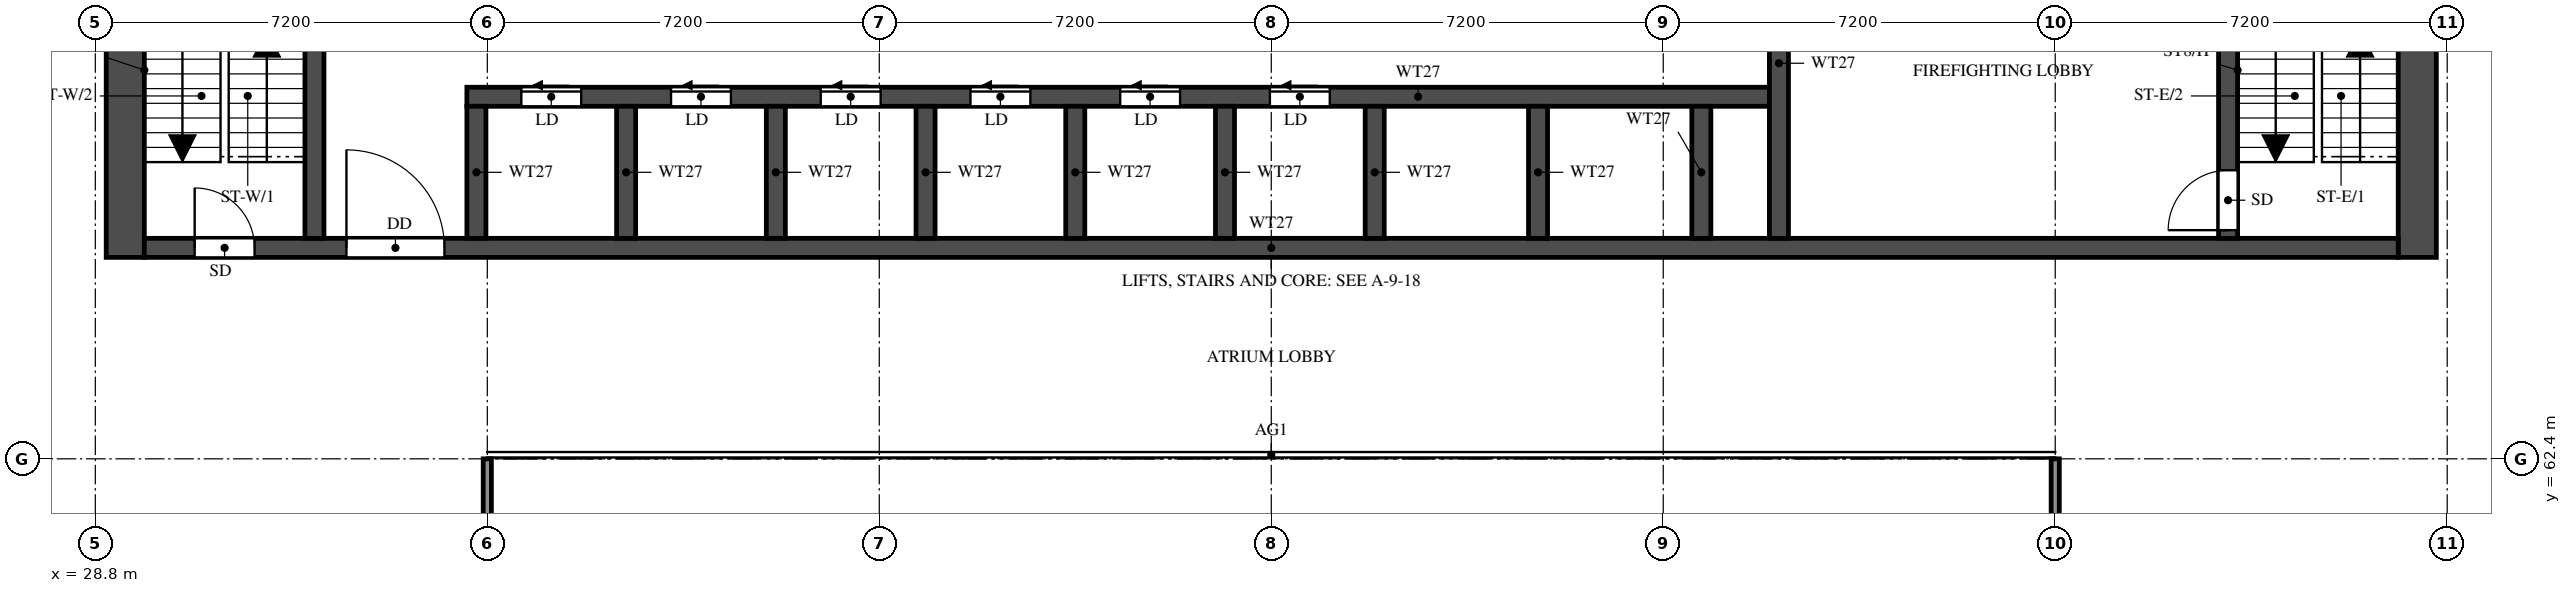
"""IFC4 building model, lengths in metres.
Left out: names, types, materials, properties, quantities, classifications, styles, units other than length and angle.
Written with IfcOpenShell. Run it as: python <this file> out.ifc"""

import sys

from ifc_helpers import new_model, si_unit, direction, frame, frame_2d, origin, place, context, subcontext, project, spatial, rectangle, extrude, element, fill, save


model = new_model("IFC4")
c1 = context("Model", 3, precision=1e-05, world=origin(), true_north=direction((0.0, 1.0)))
c2 = subcontext(c1, "Body", "Model", "MODEL_VIEW")
j1 = project(units=[si_unit("LENGTHUNIT", "METRE"), si_unit("PLANEANGLEUNIT", "RADIAN")], contexts=[c1])
p1 = place(None, origin())
s1 = spatial("IfcSite", under=j1, at=p1, CompositionType="ELEMENT")
p2 = place(p1, origin())
s2 = spatial("IfcBuilding", under=s1, at=p2, CompositionType="ELEMENT")
p3 = place(p2, frame((0.0, 0.0, 123.5)))
s3 = spatial("IfcBuildingStorey", under=s2, at=p3, CompositionType="ELEMENT", Elevation=123.5)
for number, where, z_axis, x_axis in (
    (1, (29.35, 66.1, 0.0), (0.0, 0.0, 1.0), (0.0, 1.0, 0.0)),
    (2, (71.45, 66.1, 0.0), (0.0, 0.0, 1.0), (0.0, 1.0, 0.0)),
):
    element("IfcWall", number, at=place(p3, frame(where, z_axis=z_axis, x_axis=x_axis)), inside=s3, PredefinedType="SHEAR", context=c2, shape_type="SweptSolid", body=[
        extrude(rectangle(XDim=11.9, YDim=0.7, at=frame_2d((5.95, 0.0))), origin(), (0.0, 0.0, 1.0), 3.2),
    ])
p4 = place(p3, frame((29.7, 66.275, 0.0), z_axis=(0.0, 0.0, 1.0), x_axis=(1.0, 0.0, 0.0)))
e3 = element("IfcWall", 3, at=p4, inside=s3, PredefinedType="SHEAR", context=c2, shape_type="SweptSolid", body=[
    extrude(rectangle(XDim=41.4, YDim=0.35, at=frame_2d((20.7, 0.0))), origin(), (0.0, 0.0, 1.0), 3.2),
])
p5 = place(p4, frame((0.925, 0.0, 0.0)))
e4 = element("IfcOpeningElement", 4, at=p5, cuts=e3, PredefinedType="OPENING", context=c2, shape_type="SweptSolid", body=[
    extrude(rectangle(XDim=1.1, YDim=2.1, at=frame_2d((0.55, 1.05))), frame((0.0, 0.185, 0.0), z_axis=(0.0, -1.0, 0.0), x_axis=(1.0, 0.0, 0.0)), (0.0, 0.0, 1.0), 0.37),
])
p6 = place(p4, frame((3.712, 0.0, 0.0)))
e5 = element("IfcOpeningElement", 5, at=p6, cuts=e3, PredefinedType="OPENING", context=c2, shape_type="SweptSolid", body=[
    extrude(rectangle(XDim=1.8, YDim=2.1, at=frame_2d((0.9, 1.05))), frame((0.0, 0.185, 0.0), z_axis=(0.0, -1.0, 0.0), x_axis=(1.0, 0.0, 0.0)), (0.0, 0.0, 1.0), 0.37),
])
p7 = place(p3, frame((35.625, 69.05, 0.0), z_axis=(0.0, 0.0, 1.0), x_axis=(1.0, 0.0, 0.0)))
e6 = element("IfcWall", 6, at=p7, inside=s3, PredefinedType="SHEAR", context=c2, shape_type="SweptSolid", body=[
    extrude(rectangle(XDim=24.1, YDim=0.35, at=frame_2d((12.05, 0.0))), origin(), (0.0, 0.0, 1.0), 3.2),
])
p8 = place(p7, frame((1.0, 0.0, 0.0)))
e7 = element("IfcOpeningElement", 7, at=p8, cuts=e6, PredefinedType="OPENING", context=c2, shape_type="SweptSolid", body=[
    extrude(rectangle(XDim=1.1, YDim=2.1, at=frame_2d((0.55, 1.05))), frame((0.0, 0.185, 0.0), z_axis=(0.0, -1.0, 0.0), x_axis=(1.0, 0.0, 0.0)), (0.0, 0.0, 1.0), 0.37),
])
p9 = place(p7, frame((3.75, 0.0, 0.0)))
e8 = element("IfcOpeningElement", 8, at=p9, cuts=e6, PredefinedType="OPENING", context=c2, shape_type="SweptSolid", body=[
    extrude(rectangle(XDim=1.1, YDim=2.1, at=frame_2d((0.55, 1.05))), frame((0.0, 0.185, 0.0), z_axis=(0.0, -1.0, 0.0), x_axis=(1.0, 0.0, 0.0)), (0.0, 0.0, 1.0), 0.37),
])
p10 = place(p7, frame((6.5, 0.0, 0.0)))
e9 = element("IfcOpeningElement", 9, at=p10, cuts=e6, PredefinedType="OPENING", context=c2, shape_type="SweptSolid", body=[
    extrude(rectangle(XDim=1.1, YDim=2.1, at=frame_2d((0.55, 1.05))), frame((0.0, 0.185, 0.0), z_axis=(0.0, -1.0, 0.0), x_axis=(1.0, 0.0, 0.0)), (0.0, 0.0, 1.0), 0.37),
])
p11 = place(p7, frame((9.25, 0.0, 0.0)))
e10 = element("IfcOpeningElement", 10, at=p11, cuts=e6, PredefinedType="OPENING", context=c2, shape_type="SweptSolid", body=[
    extrude(rectangle(XDim=1.1, YDim=2.1, at=frame_2d((0.55, 1.05))), frame((0.0, 0.185, 0.0), z_axis=(0.0, -1.0, 0.0), x_axis=(1.0, 0.0, 0.0)), (0.0, 0.0, 1.0), 0.37),
])
p12 = place(p7, frame((12.0, 0.0, 0.0)))
e11 = element("IfcOpeningElement", 11, at=p12, cuts=e6, PredefinedType="OPENING", context=c2, shape_type="SweptSolid", body=[
    extrude(rectangle(XDim=1.1, YDim=2.1, at=frame_2d((0.55, 1.05))), frame((0.0, 0.185, 0.0), z_axis=(0.0, -1.0, 0.0), x_axis=(1.0, 0.0, 0.0)), (0.0, 0.0, 1.0), 0.37),
])
p13 = place(p7, frame((14.75, 0.0, 0.0)))
e12 = element("IfcOpeningElement", 12, at=p13, cuts=e6, PredefinedType="OPENING", context=c2, shape_type="SweptSolid", body=[
    extrude(rectangle(XDim=1.1, YDim=2.1, at=frame_2d((0.55, 1.05))), frame((0.0, 0.185, 0.0), z_axis=(0.0, -1.0, 0.0), x_axis=(1.0, 0.0, 0.0)), (0.0, 0.0, 1.0), 0.37),
])
p14 = place(p3, frame((32.825, 66.45, 0.0), z_axis=(0.0, 0.0, 1.0), x_axis=(0.0, 1.0, 0.0)))
e13 = element("IfcWall", 13, at=p14, inside=s3, PredefinedType="SHEAR", context=c2, shape_type="SweptSolid", body=[
    extrude(rectangle(XDim=10.85, YDim=0.35, at=frame_2d((5.425, 0.0))), origin(), (0.0, 0.0, 1.0), 3.2),
])
p15 = place(p3, frame((67.975, 66.45, 0.0), z_axis=(0.0, 0.0, 1.0), x_axis=(0.0, 1.0, 0.0)))
e14 = element("IfcWall", 14, at=p15, inside=s3, PredefinedType="SHEAR", context=c2, shape_type="SweptSolid", body=[
    extrude(rectangle(XDim=10.85, YDim=0.35, at=frame_2d((5.425, 0.0))), origin(), (0.0, 0.0, 1.0), 3.2),
])
p16 = place(p15, frame((0.15, 0.0, 0.0)))
e15 = element("IfcOpeningElement", 15, at=p16, cuts=e14, PredefinedType="OPENING", context=c2, shape_type="SweptSolid", body=[
    extrude(rectangle(XDim=1.1, YDim=2.1, at=frame_2d((0.55, 1.05))), frame((0.0, 0.185, 0.0), z_axis=(0.0, -1.0, 0.0), x_axis=(1.0, 0.0, 0.0)), (0.0, 0.0, 1.0), 0.37),
])
p17 = place(p3, frame((59.725, 66.45, 0.0), z_axis=(0.0, 0.0, 1.0), x_axis=(0.0, 1.0, 0.0)))
e16 = element("IfcWall", 16, at=p17, inside=s3, PredefinedType="SHEAR", context=c2, shape_type="SweptSolid", body=[
    extrude(rectangle(XDim=6.125, YDim=0.35, at=frame_2d((3.062, 0.0))), origin(), (0.0, 0.0, 1.0), 3.2),
])
p18 = place(p17, frame((3.85, 0.0, 0.0)))
e17 = element("IfcOpeningElement", 17, at=p18, cuts=e16, PredefinedType="OPENING", context=c2, shape_type="SweptSolid", body=[
    extrude(rectangle(XDim=1.2, YDim=2.1, at=frame_2d((0.6, 1.05))), frame((0.0, 0.185, 0.0), z_axis=(0.0, -1.0, 0.0), x_axis=(1.0, 0.0, 0.0)), (0.0, 0.0, 1.0), 0.37),
])
for number, where, z_axis, x_axis in (
    (18, (35.8, 66.45, 0.0), (0.0, 0.0, 1.0), (0.0, 1.0, 0.0)),
    (19, (38.55, 66.45, 0.0), (0.0, 0.0, 1.0), (0.0, 1.0, 0.0)),
    (20, (41.3, 66.45, 0.0), (0.0, 0.0, 1.0), (0.0, 1.0, 0.0)),
    (21, (44.05, 66.45, 0.0), (0.0, 0.0, 1.0), (0.0, 1.0, 0.0)),
    (22, (46.8, 66.45, 0.0), (0.0, 0.0, 1.0), (0.0, 1.0, 0.0)),
    (23, (49.55, 66.45, 0.0), (0.0, 0.0, 1.0), (0.0, 1.0, 0.0)),
    (24, (52.3, 66.45, 0.0), (0.0, 0.0, 1.0), (0.0, 1.0, 0.0)),
    (25, (55.3, 66.45, 0.0), (0.0, 0.0, 1.0), (0.0, 1.0, 0.0)),
    (26, (58.3, 66.45, 0.0), (0.0, 0.0, 1.0), (0.0, 1.0, 0.0)),
):
    element("IfcWall", number, at=place(p3, frame(where, z_axis=z_axis, x_axis=x_axis)), inside=s3, PredefinedType="SHEAR", context=c2, shape_type="SweptSolid", body=[
        extrude(rectangle(XDim=2.425, YDim=0.35, at=frame_2d((1.212, 0.0))), origin(), (0.0, 0.0, 1.0), 3.2),
    ])
for number, where, z_axis, x_axis in (
    (27, (36.0, 48.0, 0.0), (0.0, 0.0, 1.0), (0.0, 1.0, 0.0)),
    (28, (64.8, 48.0, 0.0), (0.0, 0.0, 1.0), (0.0, 1.0, 0.0)),
):
    element("IfcWall", number, at=place(p3, frame(where, z_axis=z_axis, x_axis=x_axis)), inside=s3, PredefinedType="SOLIDWALL", context=c2, shape_type="SweptSolid", body=[
        extrude(rectangle(XDim=14.4, YDim=0.15, at=frame_2d((7.2, 0.0))), origin(), (0.0, 0.0, 1.0), 2.3),
    ])
p19 = place(p5, origin())
e29 = element("IfcDoor", 29, at=p19, inside=s3, OperationType="SINGLE_SWING_LEFT", PredefinedType="DOOR", context=c2, shape_type="SweptSolid", body=[
    extrude(rectangle(XDim=1.1, YDim=2.1, at=frame_2d((0.55, 1.05))), frame((0.0, 0.025, 0.0), z_axis=(0.0, -1.0, 0.0), x_axis=(1.0, 0.0, 0.0)), (0.0, 0.0, 1.0), 0.05),
])
fill(e4, e29)
p20 = place(p16, origin())
e30 = element("IfcDoor", 30, at=p20, inside=s3, OperationType="SINGLE_SWING_LEFT", PredefinedType="DOOR", context=c2, shape_type="SweptSolid", body=[
    extrude(rectangle(XDim=1.1, YDim=2.1, at=frame_2d((0.55, 1.05))), frame((0.0, 0.025, 0.0), z_axis=(0.0, -1.0, 0.0), x_axis=(1.0, 0.0, 0.0)), (0.0, 0.0, 1.0), 0.05),
])
fill(e15, e30)
p21 = place(p6, origin())
e31 = element("IfcDoor", 31, at=p21, inside=s3, OperationType="DOUBLE_DOOR_SINGLE_SWING", PredefinedType="DOOR", context=c2, shape_type="SweptSolid", body=[
    extrude(rectangle(XDim=1.8, YDim=2.1, at=frame_2d((0.9, 1.05))), frame((0.0, 0.025, 0.0), z_axis=(0.0, -1.0, 0.0), x_axis=(1.0, 0.0, 0.0)), (0.0, 0.0, 1.0), 0.05),
])
fill(e5, e31)
p22 = place(p8, origin())
e32 = element("IfcDoor", 32, at=p22, inside=s3, OperationType="SLIDING_TO_LEFT", PredefinedType="DOOR", context=c2, shape_type="SweptSolid", body=[
    extrude(rectangle(XDim=1.1, YDim=2.1, at=frame_2d((0.55, 1.05))), frame((0.0, 0.025, 0.0), z_axis=(0.0, -1.0, 0.0), x_axis=(1.0, 0.0, 0.0)), (0.0, 0.0, 1.0), 0.05),
])
fill(e7, e32)
p23 = place(p9, origin())
e33 = element("IfcDoor", 33, at=p23, inside=s3, OperationType="SLIDING_TO_LEFT", PredefinedType="DOOR", context=c2, shape_type="SweptSolid", body=[
    extrude(rectangle(XDim=1.1, YDim=2.1, at=frame_2d((0.55, 1.05))), frame((0.0, 0.025, 0.0), z_axis=(0.0, -1.0, 0.0), x_axis=(1.0, 0.0, 0.0)), (0.0, 0.0, 1.0), 0.05),
])
fill(e8, e33)
p24 = place(p10, origin())
e34 = element("IfcDoor", 34, at=p24, inside=s3, OperationType="SLIDING_TO_LEFT", PredefinedType="DOOR", context=c2, shape_type="SweptSolid", body=[
    extrude(rectangle(XDim=1.1, YDim=2.1, at=frame_2d((0.55, 1.05))), frame((0.0, 0.025, 0.0), z_axis=(0.0, -1.0, 0.0), x_axis=(1.0, 0.0, 0.0)), (0.0, 0.0, 1.0), 0.05),
])
fill(e9, e34)
p25 = place(p11, origin())
e35 = element("IfcDoor", 35, at=p25, inside=s3, OperationType="SLIDING_TO_LEFT", PredefinedType="DOOR", context=c2, shape_type="SweptSolid", body=[
    extrude(rectangle(XDim=1.1, YDim=2.1, at=frame_2d((0.55, 1.05))), frame((0.0, 0.025, 0.0), z_axis=(0.0, -1.0, 0.0), x_axis=(1.0, 0.0, 0.0)), (0.0, 0.0, 1.0), 0.05),
])
fill(e10, e35)
p26 = place(p12, origin())
e36 = element("IfcDoor", 36, at=p26, inside=s3, OperationType="SLIDING_TO_LEFT", PredefinedType="DOOR", context=c2, shape_type="SweptSolid", body=[
    extrude(rectangle(XDim=1.1, YDim=2.1, at=frame_2d((0.55, 1.05))), frame((0.0, 0.025, 0.0), z_axis=(0.0, -1.0, 0.0), x_axis=(1.0, 0.0, 0.0)), (0.0, 0.0, 1.0), 0.05),
])
fill(e11, e36)
p27 = place(p13, origin())
e37 = element("IfcDoor", 37, at=p27, inside=s3, OperationType="SLIDING_TO_LEFT", PredefinedType="DOOR", context=c2, shape_type="SweptSolid", body=[
    extrude(rectangle(XDim=1.1, YDim=2.1, at=frame_2d((0.55, 1.05))), frame((0.0, 0.025, 0.0), z_axis=(0.0, -1.0, 0.0), x_axis=(1.0, 0.0, 0.0)), (0.0, 0.0, 1.0), 0.05),
])
fill(e12, e37)
save(model, sys.argv[1])
